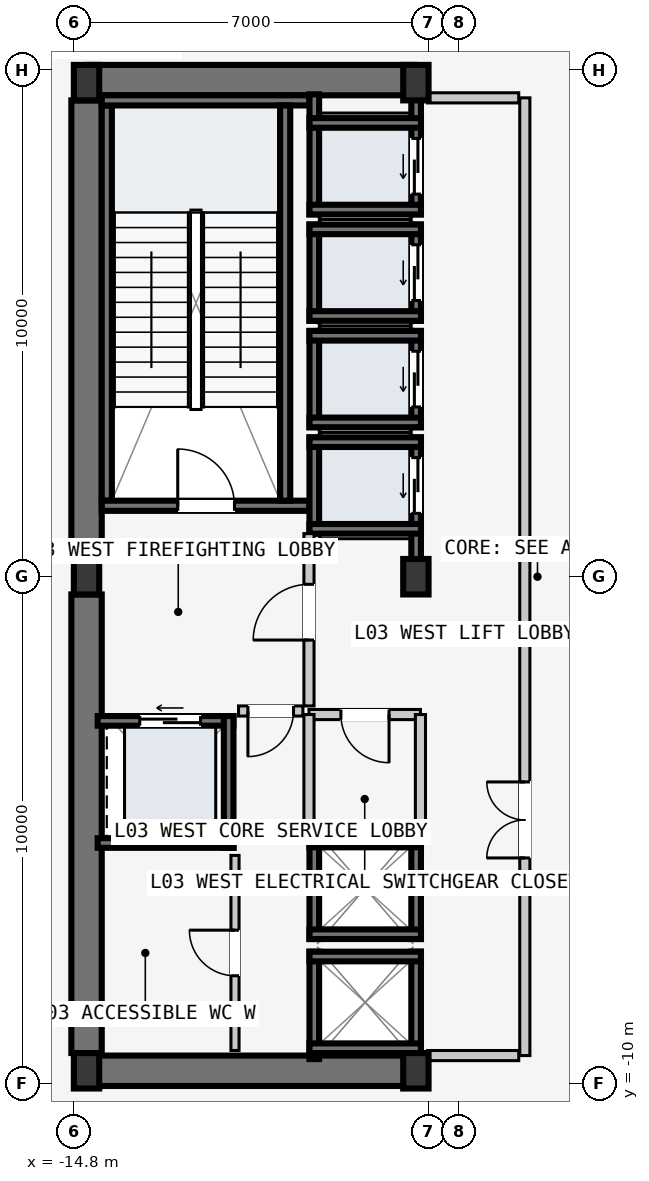
"""IFC4 building model, lengths in metres.
Left out: names, types, materials, properties, quantities, classifications, styles, units other than length and angle.
Written with IfcOpenShell. Run it as: python <this file> out.ifc"""

import sys

from ifc_helpers import new_model, si_unit, direction, frame, frame_2d, origin, origin_2d, place, context, subcontext, project, spatial, rectangle, i_section, extrude, element, fill, save


model = new_model("IFC4")
c1 = context("Model", 3, precision=1e-05, world=origin(), true_north=direction((0.0, 1.0)))
c2 = subcontext(c1, "Body", "Model", "MODEL_VIEW")
j1 = project(units=[si_unit("LENGTHUNIT", "METRE"), si_unit("PLANEANGLEUNIT", "RADIAN")], contexts=[c1])
p1 = place(None, origin())
s1 = spatial("IfcSite", under=j1, at=p1, CompositionType="ELEMENT")
p2 = place(p1, origin())
s2 = spatial("IfcBuilding", under=s1, at=p2, CompositionType="ELEMENT")
p3 = place(p2, frame((0.0, 0.0, 14.4)))
s3 = spatial("IfcBuildingStorey", under=s2, at=p3, CompositionType="ELEMENT", Elevation=14.4)
for number, where, z_axis, x_axis in (
    (1, (-14.53, -9.75, -0.22), (0.0, 0.0, 1.0), (1.0, 0.0, 0.0)),
    (2, (-14.53, 9.8, -0.22), (0.0, 0.0, 1.0), (1.0, 0.0, 0.0)),
):
    element("IfcWall", number, at=place(p3, frame(where, z_axis=z_axis, x_axis=x_axis)), inside=s3, PredefinedType="SHEAR", context=c2, shape_type="SweptSolid", body=[
        extrude(rectangle(XDim=6.46, YDim=0.6, at=frame_2d((3.23, 0.0))), origin(), (0.0, 0.0, 1.0), 4.8),
    ])
for number, where, z_axis, x_axis in (
    (3, (-14.55, -9.4, -0.22), (0.0, 0.0, 1.0), (0.0, 1.0, 0.0)),
    (4, (-14.55, 0.35, -0.22), (0.0, 0.0, 1.0), (0.0, 1.0, 0.0)),
):
    element("IfcWall", number, at=place(p3, frame(where, z_axis=z_axis, x_axis=x_axis)), inside=s3, PredefinedType="SHEAR", context=c2, shape_type="SweptSolid", body=[
        extrude(rectangle(XDim=9.05, YDim=0.6, at=frame_2d((4.525, 0.0))), origin(), (0.0, 0.0, 1.0), 4.8),
    ])
p4 = place(p3, frame((-14.15, 1.5, -0.22), z_axis=(0.0, 0.0, 1.0), x_axis=(0.0, 1.0, 0.0)))
e5 = element("IfcWall", 5, at=p4, inside=s3, PredefinedType="SOLIDWALL", context=c2, shape_type="SweptSolid", body=[
    extrude(rectangle(XDim=7.8, YDim=0.2, at=frame_2d((3.9, 0.0))), origin(), (0.0, 0.0, 1.0), 4.8),
])
p5 = place(p3, frame((-14.25, 1.4, -0.22), z_axis=(0.0, 0.0, 1.0), x_axis=(1.0, 0.0, 0.0)))
e6 = element("IfcWall", 6, at=p5, inside=s3, PredefinedType="SOLIDWALL", context=c2, shape_type="SweptSolid", body=[
    extrude(rectangle(XDim=4.1, YDim=0.2, at=frame_2d((2.05, 0.0))), origin(), (0.0, 0.0, 1.0), 4.8),
])
p6 = place(p5, frame((1.5, 0.0, 0.22)))
e7 = element("IfcOpeningElement", 7, at=p6, cuts=e6, PredefinedType="OPENING", context=c2, shape_type="SweptSolid", body=[
    extrude(rectangle(XDim=1.12, YDim=2.18, at=frame_2d((0.56, 1.09))), frame((0.0, 0.11, 0.0), z_axis=(0.0, -1.0, 0.0), x_axis=(1.0, 0.0, 0.0)), (0.0, 0.0, 1.0), 0.22),
])
p7 = place(p3, frame((-14.25, 9.4, -0.22), z_axis=(0.0, 0.0, 1.0), x_axis=(1.0, 0.0, 0.0)))
e8 = element("IfcWall", 8, at=p7, inside=s3, PredefinedType="SOLIDWALL", context=c2, shape_type="SweptSolid", body=[
    extrude(rectangle(XDim=4.1, YDim=0.2, at=frame_2d((2.05, 0.0))), origin(), (0.0, 0.0, 1.0), 4.8),
])
p8 = place(p3, frame((-10.63, 1.5, -0.22), z_axis=(0.0, 0.0, 1.0), x_axis=(0.0, 1.0, 0.0)))
e9 = element("IfcWall", 9, at=p8, inside=s3, PredefinedType="SOLIDWALL", context=c2, shape_type="SweptSolid", body=[
    extrude(rectangle(XDim=7.8, YDim=0.2, at=frame_2d((3.9, 0.0))), origin(), (0.0, 0.0, 1.0), 4.8),
])
for number, where, z_axis, x_axis in (
    (10, (-14.55, -9.75, 0.0), (0.0, 0.0, 1.0), (1.0, 0.0, 0.0)),
    (11, (-14.55, 0.0, 0.0), (0.0, 0.0, 1.0), (1.0, 0.0, 0.0)),
    (12, (-14.55, 9.75, 0.0), (0.0, 0.0, 1.0), (1.0, 0.0, 0.0)),
    (13, (-8.05, -9.75, 0.0), (0.0, 0.0, 1.0), (1.0, 0.0, 0.0)),
    (14, (-8.05, 0.0, 0.0), (0.0, 0.0, 1.0), (1.0, 0.0, 0.0)),
    (15, (-8.05, 9.75, 0.0), (0.0, 0.0, 1.0), (1.0, 0.0, 0.0)),
):
    element("IfcColumn", number, at=place(p3, frame(where, z_axis=z_axis, x_axis=x_axis)), inside=s3, PredefinedType="COLUMN", context=c2, shape_type="SweptSolid", body=[
        extrude(i_section(OverallWidth=0.5, OverallDepth=0.7, WebThickness=0.028, FlangeThickness=0.045, at=origin_2d()), origin(), (0.0, 0.0, 1.0), 4.8),
    ])
p9 = place(p3, frame((-8.045, 0.21, -0.22), z_axis=(0.0, 0.0, 1.0), x_axis=(0.0, 1.0, 0.0)))
e16 = element("IfcWall", 16, at=p9, inside=s3, PredefinedType="SOLIDWALL", context=c2, shape_type="SweptSolid", body=[
    extrude(rectangle(XDim=2.54, YDim=0.19, at=frame_2d((1.27, 0.0))), origin(), (0.0, 0.0, 1.0), 4.8),
])
p10 = place(p9, frame((1.04, 0.0, 0.22)))
e17 = element("IfcOpeningElement", 17, at=p10, cuts=e16, PredefinedType="OPENING", context=c2, shape_type="SweptSolid", body=[
    extrude(rectangle(XDim=1.1, YDim=2.2, at=frame_2d((0.55, 1.1))), frame((0.0, 0.105, 0.0), z_axis=(0.0, -1.0, 0.0), x_axis=(1.0, 0.0, 0.0)), (0.0, 0.0, 1.0), 0.21),
])
p11 = place(p3, frame((-10.055, 0.85, -0.22), z_axis=(0.0, 0.0, 1.0), x_axis=(0.0, 1.0, 0.0)))
e18 = element("IfcWall", 18, at=p11, inside=s3, PredefinedType="SOLIDWALL", context=c2, shape_type="SweptSolid", body=[
    extrude(rectangle(XDim=1.9, YDim=0.19, at=frame_2d((0.95, 0.0))), origin(), (0.0, 0.0, 1.0), 4.8),
])
for number, where, z_axis, x_axis in (
    (19, (-10.15, 2.655, -0.22), (0.0, 0.0, 1.0), (1.0, 0.0, 0.0)),
    (20, (-10.15, 0.945, -0.22), (0.0, 0.0, 1.0), (1.0, 0.0, 0.0)),
):
    element("IfcWall", number, at=place(p3, frame(where, z_axis=z_axis, x_axis=x_axis)), inside=s3, PredefinedType="SOLIDWALL", context=c2, shape_type="SweptSolid", body=[
        extrude(rectangle(XDim=2.2, YDim=0.19, at=frame_2d((1.1, 0.0))), origin(), (0.0, 0.0, 1.0), 4.8),
    ])
p12 = place(p3, frame((-8.045, 2.95, -0.22), z_axis=(0.0, 0.0, 1.0), x_axis=(0.0, 1.0, 0.0)))
e21 = element("IfcWall", 21, at=p12, inside=s3, PredefinedType="SOLIDWALL", context=c2, shape_type="SweptSolid", body=[
    extrude(rectangle(XDim=1.9, YDim=0.19, at=frame_2d((0.95, 0.0))), origin(), (0.0, 0.0, 1.0), 4.8),
])
p13 = place(p12, frame((0.4, 0.0, 0.22)))
e22 = element("IfcOpeningElement", 22, at=p13, cuts=e21, PredefinedType="OPENING", context=c2, shape_type="SweptSolid", body=[
    extrude(rectangle(XDim=1.1, YDim=2.2, at=frame_2d((0.55, 1.1))), frame((0.0, 0.105, 0.0), z_axis=(0.0, -1.0, 0.0), x_axis=(1.0, 0.0, 0.0)), (0.0, 0.0, 1.0), 0.21),
])
p14 = place(p3, frame((-10.055, 2.95, -0.22), z_axis=(0.0, 0.0, 1.0), x_axis=(0.0, 1.0, 0.0)))
e23 = element("IfcWall", 23, at=p14, inside=s3, PredefinedType="SOLIDWALL", context=c2, shape_type="SweptSolid", body=[
    extrude(rectangle(XDim=1.9, YDim=0.19, at=frame_2d((0.95, 0.0))), origin(), (0.0, 0.0, 1.0), 4.8),
])
for number, where, z_axis, x_axis in (
    (24, (-10.15, 4.755, -0.22), (0.0, 0.0, 1.0), (1.0, 0.0, 0.0)),
    (25, (-10.15, 3.045, -0.22), (0.0, 0.0, 1.0), (1.0, 0.0, 0.0)),
):
    element("IfcWall", number, at=place(p3, frame(where, z_axis=z_axis, x_axis=x_axis)), inside=s3, PredefinedType="SOLIDWALL", context=c2, shape_type="SweptSolid", body=[
        extrude(rectangle(XDim=2.2, YDim=0.19, at=frame_2d((1.1, 0.0))), origin(), (0.0, 0.0, 1.0), 4.8),
    ])
p15 = place(p3, frame((-8.045, 5.05, -0.22), z_axis=(0.0, 0.0, 1.0), x_axis=(0.0, 1.0, 0.0)))
e26 = element("IfcWall", 26, at=p15, inside=s3, PredefinedType="SOLIDWALL", context=c2, shape_type="SweptSolid", body=[
    extrude(rectangle(XDim=1.9, YDim=0.19, at=frame_2d((0.95, 0.0))), origin(), (0.0, 0.0, 1.0), 4.8),
])
p16 = place(p15, frame((0.4, 0.0, 0.22)))
e27 = element("IfcOpeningElement", 27, at=p16, cuts=e26, PredefinedType="OPENING", context=c2, shape_type="SweptSolid", body=[
    extrude(rectangle(XDim=1.1, YDim=2.2, at=frame_2d((0.55, 1.1))), frame((0.0, 0.105, 0.0), z_axis=(0.0, -1.0, 0.0), x_axis=(1.0, 0.0, 0.0)), (0.0, 0.0, 1.0), 0.21),
])
p17 = place(p3, frame((-10.055, 5.05, -0.22), z_axis=(0.0, 0.0, 1.0), x_axis=(0.0, 1.0, 0.0)))
e28 = element("IfcWall", 28, at=p17, inside=s3, PredefinedType="SOLIDWALL", context=c2, shape_type="SweptSolid", body=[
    extrude(rectangle(XDim=1.9, YDim=0.19, at=frame_2d((0.95, 0.0))), origin(), (0.0, 0.0, 1.0), 4.8),
])
for number, where, z_axis, x_axis in (
    (29, (-10.15, 6.855, -0.22), (0.0, 0.0, 1.0), (1.0, 0.0, 0.0)),
    (30, (-10.15, 5.145, -0.22), (0.0, 0.0, 1.0), (1.0, 0.0, 0.0)),
):
    element("IfcWall", number, at=place(p3, frame(where, z_axis=z_axis, x_axis=x_axis)), inside=s3, PredefinedType="SOLIDWALL", context=c2, shape_type="SweptSolid", body=[
        extrude(rectangle(XDim=2.2, YDim=0.19, at=frame_2d((1.1, 0.0))), origin(), (0.0, 0.0, 1.0), 4.8),
    ])
p18 = place(p3, frame((-8.045, 7.15, -0.22), z_axis=(0.0, 0.0, 1.0), x_axis=(0.0, 1.0, 0.0)))
e31 = element("IfcWall", 31, at=p18, inside=s3, PredefinedType="SOLIDWALL", context=c2, shape_type="SweptSolid", body=[
    extrude(rectangle(XDim=2.37, YDim=0.19, at=frame_2d((1.185, 0.0))), origin(), (0.0, 0.0, 1.0), 4.8),
])
p19 = place(p18, frame((0.4, 0.0, 0.22)))
e32 = element("IfcOpeningElement", 32, at=p19, cuts=e31, PredefinedType="OPENING", context=c2, shape_type="SweptSolid", body=[
    extrude(rectangle(XDim=1.1, YDim=2.2, at=frame_2d((0.55, 1.1))), frame((0.0, 0.105, 0.0), z_axis=(0.0, -1.0, 0.0), x_axis=(1.0, 0.0, 0.0)), (0.0, 0.0, 1.0), 0.21),
])
p20 = place(p3, frame((-10.055, 7.15, -0.22), z_axis=(0.0, 0.0, 1.0), x_axis=(0.0, 1.0, 0.0)))
e33 = element("IfcWall", 33, at=p20, inside=s3, PredefinedType="SOLIDWALL", context=c2, shape_type="SweptSolid", body=[
    extrude(rectangle(XDim=2.37, YDim=0.19, at=frame_2d((1.185, 0.0))), origin(), (0.0, 0.0, 1.0), 4.8),
])
for number, where, z_axis, x_axis in (
    (34, (-10.15, 8.955, -0.22), (0.0, 0.0, 1.0), (1.0, 0.0, 0.0)),
    (35, (-10.15, 7.245, -0.22), (0.0, 0.0, 1.0), (1.0, 0.0, 0.0)),
):
    element("IfcWall", number, at=place(p3, frame(where, z_axis=z_axis, x_axis=x_axis)), inside=s3, PredefinedType="SOLIDWALL", context=c2, shape_type="SweptSolid", body=[
        extrude(rectangle(XDim=2.2, YDim=0.19, at=frame_2d((1.1, 0.0))), origin(), (0.0, 0.0, 1.0), 4.8),
    ])
for number, where, z_axis, x_axis in (
    (36, (-8.045, -9.52, -0.22), (0.0, 0.0, 1.0), (0.0, 1.0, 0.0)),
    (37, (-10.055, -9.52, -0.22), (0.0, 0.0, 1.0), (0.0, 1.0, 0.0)),
):
    element("IfcWall", number, at=place(p3, frame(where, z_axis=z_axis, x_axis=x_axis)), inside=s3, PredefinedType="SOLIDWALL", context=c2, shape_type="SweptSolid", body=[
        extrude(rectangle(XDim=2.12, YDim=0.19, at=frame_2d((1.06, 0.0))), origin(), (0.0, 0.0, 1.0), 4.8),
    ])
for number, where, z_axis, x_axis in (
    (38, (-10.15, -7.495, -0.22), (0.0, 0.0, 1.0), (1.0, 0.0, 0.0)),
    (39, (-10.15, -9.305, -0.22), (0.0, 0.0, 1.0), (1.0, 0.0, 0.0)),
):
    element("IfcWall", number, at=place(p3, frame(where, z_axis=z_axis, x_axis=x_axis)), inside=s3, PredefinedType="SOLIDWALL", context=c2, shape_type="SweptSolid", body=[
        extrude(rectangle(XDim=2.2, YDim=0.19, at=frame_2d((1.1, 0.0))), origin(), (0.0, 0.0, 1.0), 4.8),
    ])
for number, where, z_axis, x_axis in (
    (40, (-8.045, -7.15, -0.22), (0.0, 0.0, 1.0), (0.0, 1.0, 0.0)),
    (41, (-10.055, -7.15, -0.22), (0.0, 0.0, 1.0), (0.0, 1.0, 0.0)),
):
    element("IfcWall", number, at=place(p3, frame(where, z_axis=z_axis, x_axis=x_axis)), inside=s3, PredefinedType="SOLIDWALL", context=c2, shape_type="SweptSolid", body=[
        extrude(rectangle(XDim=2.0, YDim=0.19, at=frame_2d((1.0, 0.0))), origin(), (0.0, 0.0, 1.0), 4.8),
    ])
for number, where, z_axis, x_axis in (
    (42, (-10.15, -5.245, -0.22), (0.0, 0.0, 1.0), (1.0, 0.0, 0.0)),
    (43, (-10.15, -7.055, -0.22), (0.0, 0.0, 1.0), (1.0, 0.0, 0.0)),
):
    element("IfcWall", number, at=place(p3, frame(where, z_axis=z_axis, x_axis=x_axis)), inside=s3, PredefinedType="SOLIDWALL", context=c2, shape_type="SweptSolid", body=[
        extrude(rectangle(XDim=2.2, YDim=0.19, at=frame_2d((1.1, 0.0))), origin(), (0.0, 0.0, 1.0), 4.8),
    ])
p21 = place(p3, frame((-14.33, -2.845, -0.22), z_axis=(0.0, 0.0, 1.0), x_axis=(1.0, 0.0, 0.0)))
e44 = element("IfcWall", 44, at=p21, inside=s3, PredefinedType="SOLIDWALL", context=c2, shape_type="SweptSolid", body=[
    extrude(rectangle(XDim=2.68, YDim=0.19, at=frame_2d((1.34, 0.0))), origin(), (0.0, 0.0, 1.0), 4.8),
])
p22 = place(p21, frame((0.83, 0.0, 0.22)))
e45 = element("IfcOpeningElement", 45, at=p22, cuts=e44, PredefinedType="OPENING", context=c2, shape_type="SweptSolid", body=[
    extrude(rectangle(XDim=1.2, YDim=2.2, at=frame_2d((0.6, 1.1))), frame((0.0, 0.105, 0.0), z_axis=(0.0, -1.0, 0.0), x_axis=(1.0, 0.0, 0.0)), (0.0, 0.0, 1.0), 0.21),
])
p23 = place(p3, frame((-14.33, -5.255, -0.22), z_axis=(0.0, 0.0, 1.0), x_axis=(1.0, 0.0, 0.0)))
e46 = element("IfcWall", 46, at=p23, inside=s3, PredefinedType="SOLIDWALL", context=c2, shape_type="SweptSolid", body=[
    extrude(rectangle(XDim=2.68, YDim=0.19, at=frame_2d((1.34, 0.0))), origin(), (0.0, 0.0, 1.0), 4.8),
])
p24 = place(p3, frame((-11.745, -5.35, -0.22), z_axis=(0.0, 0.0, 1.0), x_axis=(0.0, 1.0, 0.0)))
e47 = element("IfcWall", 47, at=p24, inside=s3, PredefinedType="SOLIDWALL", context=c2, shape_type="SweptSolid", body=[
    extrude(rectangle(XDim=2.6, YDim=0.19, at=frame_2d((1.3, 0.0))), origin(), (0.0, 0.0, 1.0), 4.8),
])
p25 = place(p3, frame((-5.9, -9.45, 0.0), z_axis=(0.0, 0.0, 1.0), x_axis=(0.0, 1.0, 0.0)))
e48 = element("IfcWall", 48, at=p25, inside=s3, PredefinedType="PARTITIONING", context=c2, shape_type="SweptSolid", body=[
    extrude(rectangle(XDim=18.9, YDim=0.2, at=frame_2d((9.45, 0.0))), origin(), (0.0, 0.0, 1.0), 4.58),
])
p26 = place(p25, frame((3.9, 0.0, 0.0)))
e49 = element("IfcOpeningElement", 49, at=p26, cuts=e48, PredefinedType="OPENING", context=c2, shape_type="SweptSolid", body=[
    extrude(rectangle(XDim=1.5, YDim=2.2, at=frame_2d((0.75, 1.1))), frame((0.0, 0.11, 0.0), z_axis=(0.0, -1.0, 0.0), x_axis=(1.0, 0.0, 0.0)), (0.0, 0.0, 1.0), 0.22),
])
for number, where, z_axis, x_axis in (
    (50, (-6.02, -9.45, 0.0), (0.0, 0.0, 1.0), (-1.0, 0.0, 0.0)),
    (51, (-6.02, 9.45, 0.0), (0.0, 0.0, 1.0), (-1.0, 0.0, 0.0)),
):
    element("IfcWall", number, at=place(p3, frame(where, z_axis=z_axis, x_axis=x_axis)), inside=s3, PredefinedType="PARTITIONING", context=c2, shape_type="SweptSolid", body=[
        extrude(rectangle(XDim=1.8, YDim=0.2, at=frame_2d((0.9, 0.0))), origin(), (0.0, 0.0, 1.0), 2.63),
    ])
p27 = place(p3, frame((-10.16, -2.55, 0.0), z_axis=(0.0, 0.0, 1.0), x_axis=(0.0, 1.0, 0.0)))
e52 = element("IfcWall", 52, at=p27, inside=s3, PredefinedType="PARTITIONING", context=c2, shape_type="SweptSolid", body=[
    extrude(rectangle(XDim=3.4, YDim=0.2, at=frame_2d((1.7, 0.0))), origin(), (0.0, 0.0, 1.0), 4.58),
])
p28 = place(p27, frame((1.3, 0.0, 0.0)))
e53 = element("IfcOpeningElement", 53, at=p28, cuts=e52, PredefinedType="OPENING", context=c2, shape_type="SweptSolid", body=[
    extrude(rectangle(XDim=1.1, YDim=2.15, at=frame_2d((0.55, 1.075))), frame((0.0, 0.11, 0.0), z_axis=(0.0, -1.0, 0.0), x_axis=(1.0, 0.0, 0.0)), (0.0, 0.0, 1.0), 0.22),
])
p29 = place(p3, frame((-10.28, -2.65, 0.0), z_axis=(0.0, 0.0, 1.0), x_axis=(-1.0, 0.0, 0.0)))
e54 = element("IfcWall", 54, at=p29, inside=s3, PredefinedType="PARTITIONING", context=c2, shape_type="SweptSolid", body=[
    extrude(rectangle(XDim=1.27, YDim=0.2, at=frame_2d((0.635, 0.0))), origin(), (0.0, 0.0, 1.0), 4.58),
])
p30 = place(p29, frame((0.185, 0.0, 0.0)))
e55 = element("IfcOpeningElement", 55, at=p30, cuts=e54, PredefinedType="OPENING", context=c2, shape_type="SweptSolid", body=[
    extrude(rectangle(XDim=0.9, YDim=2.15, at=frame_2d((0.45, 1.075))), frame((0.0, 0.11, 0.0), z_axis=(0.0, -1.0, 0.0), x_axis=(1.0, 0.0, 0.0)), (0.0, 0.0, 1.0), 0.22),
])
p31 = place(p3, frame((-7.96, -2.72, 0.0), z_axis=(0.0, 0.0, 1.0), x_axis=(-1.0, 0.0, 0.0)))
e56 = element("IfcWall", 56, at=p31, inside=s3, PredefinedType="PARTITIONING", context=c2, shape_type="SweptSolid", body=[
    extrude(rectangle(XDim=2.2, YDim=0.2, at=frame_2d((1.1, 0.0))), origin(), (0.0, 0.0, 1.0), 4.58),
])
p32 = place(p31, frame((0.62, 0.0, 0.0)))
e57 = element("IfcOpeningElement", 57, at=p32, cuts=e56, PredefinedType="OPENING", context=c2, shape_type="SweptSolid", body=[
    extrude(rectangle(XDim=0.95, YDim=2.1, at=frame_2d((0.475, 1.05))), frame((0.0, 0.11, 0.0), z_axis=(0.0, -1.0, 0.0), x_axis=(1.0, 0.0, 0.0)), (0.0, 0.0, 1.0), 0.22),
])
for number, where, z_axis, x_axis in (
    (58, (-7.96, -5.16, 0.0), (0.0, 0.0, 1.0), (0.0, 1.0, 0.0)),
    (59, (-10.16, -5.16, 0.0), (0.0, 0.0, 1.0), (0.0, 1.0, 0.0)),
):
    element("IfcWall", number, at=place(p3, frame(where, z_axis=z_axis, x_axis=x_axis)), inside=s3, PredefinedType="PARTITIONING", context=c2, shape_type="SweptSolid", body=[
        extrude(rectangle(XDim=2.44, YDim=0.2, at=frame_2d((1.22, 0.0))), origin(), (0.0, 0.0, 1.0), 4.58),
    ])
p33 = place(p3, frame((-11.62, -9.35, 0.0), z_axis=(0.0, 0.0, 1.0), x_axis=(0.0, 1.0, 0.0)))
e60 = element("IfcWall", 60, at=p33, inside=s3, PredefinedType="PARTITIONING", context=c2, shape_type="SweptSolid", body=[
    extrude(rectangle(XDim=3.85, YDim=0.16, at=frame_2d((1.925, 0.0))), origin(), (0.0, 0.0, 1.0), 4.58),
])
p34 = place(p33, frame((1.475, 0.0, 0.0)))
e61 = element("IfcOpeningElement", 61, at=p34, cuts=e60, PredefinedType="OPENING", context=c2, shape_type="SweptSolid", body=[
    extrude(rectangle(XDim=0.9, YDim=2.15, at=frame_2d((0.45, 1.075))), frame((0.0, 0.09, 0.0), z_axis=(0.0, -1.0, 0.0), x_axis=(1.0, 0.0, 0.0)), (0.0, 0.0, 1.0), 0.18),
])
p35 = place(p6, origin())
e62 = element("IfcDoor", 62, at=p35, inside=s3, OperationType="SINGLE_SWING_LEFT", PredefinedType="DOOR", context=c2, shape_type="SweptSolid", body=[
    extrude(rectangle(XDim=1.12, YDim=2.18, at=frame_2d((0.56, 1.09))), frame((0.0, 0.025, 0.0), z_axis=(0.0, -1.0, 0.0), x_axis=(1.0, 0.0, 0.0)), (0.0, 0.0, 1.0), 0.05),
])
fill(e7, e62)
p36 = place(p10, origin())
e63 = element("IfcDoor", 63, at=p36, inside=s3, OperationType="SLIDING_TO_LEFT", PredefinedType="DOOR", context=c2, shape_type="SweptSolid", body=[
    extrude(rectangle(XDim=1.1, YDim=2.2, at=frame_2d((0.55, 1.1))), frame((0.0, 0.025, 0.0), z_axis=(0.0, -1.0, 0.0), x_axis=(1.0, 0.0, 0.0)), (0.0, 0.0, 1.0), 0.05),
])
fill(e17, e63)
p37 = place(p13, origin())
e64 = element("IfcDoor", 64, at=p37, inside=s3, OperationType="SLIDING_TO_LEFT", PredefinedType="DOOR", context=c2, shape_type="SweptSolid", body=[
    extrude(rectangle(XDim=1.1, YDim=2.2, at=frame_2d((0.55, 1.1))), frame((0.0, 0.025, 0.0), z_axis=(0.0, -1.0, 0.0), x_axis=(1.0, 0.0, 0.0)), (0.0, 0.0, 1.0), 0.05),
])
fill(e22, e64)
p38 = place(p16, origin())
e65 = element("IfcDoor", 65, at=p38, inside=s3, OperationType="SLIDING_TO_LEFT", PredefinedType="DOOR", context=c2, shape_type="SweptSolid", body=[
    extrude(rectangle(XDim=1.1, YDim=2.2, at=frame_2d((0.55, 1.1))), frame((0.0, 0.025, 0.0), z_axis=(0.0, -1.0, 0.0), x_axis=(1.0, 0.0, 0.0)), (0.0, 0.0, 1.0), 0.05),
])
fill(e27, e65)
p39 = place(p19, origin())
e66 = element("IfcDoor", 66, at=p39, inside=s3, OperationType="SLIDING_TO_LEFT", PredefinedType="DOOR", context=c2, shape_type="SweptSolid", body=[
    extrude(rectangle(XDim=1.1, YDim=2.2, at=frame_2d((0.55, 1.1))), frame((0.0, 0.025, 0.0), z_axis=(0.0, -1.0, 0.0), x_axis=(1.0, 0.0, 0.0)), (0.0, 0.0, 1.0), 0.05),
])
fill(e32, e66)
p40 = place(p22, origin())
e67 = element("IfcDoor", 67, at=p40, inside=s3, OperationType="SLIDING_TO_LEFT", PredefinedType="DOOR", context=c2, shape_type="SweptSolid", body=[
    extrude(rectangle(XDim=1.2, YDim=2.2, at=frame_2d((0.6, 1.1))), frame((0.0, 0.025, 0.0), z_axis=(0.0, -1.0, 0.0), x_axis=(1.0, 0.0, 0.0)), (0.0, 0.0, 1.0), 0.05),
])
fill(e45, e67)
p41 = place(p26, origin())
e68 = element("IfcDoor", 68, at=p41, inside=s3, OperationType="DOUBLE_DOOR_SINGLE_SWING", PredefinedType="DOOR", context=c2, shape_type="SweptSolid", body=[
    extrude(rectangle(XDim=1.5, YDim=2.2, at=frame_2d((0.75, 1.1))), frame((0.0, 0.025, 0.0), z_axis=(0.0, -1.0, 0.0), x_axis=(1.0, 0.0, 0.0)), (0.0, 0.0, 1.0), 0.05),
])
fill(e49, e68)
p42 = place(p28, origin())
e69 = element("IfcDoor", 69, at=p42, inside=s3, OperationType="SINGLE_SWING_LEFT", PredefinedType="DOOR", context=c2, shape_type="SweptSolid", body=[
    extrude(rectangle(XDim=1.1, YDim=2.15, at=frame_2d((0.55, 1.075))), frame((0.0, 0.025, 0.0), z_axis=(0.0, -1.0, 0.0), x_axis=(1.0, 0.0, 0.0)), (0.0, 0.0, 1.0), 0.05),
])
fill(e53, e69)
p43 = place(p30, origin())
e70 = element("IfcDoor", 70, at=p43, inside=s3, OperationType="SINGLE_SWING_RIGHT", PredefinedType="DOOR", context=c2, shape_type="SweptSolid", body=[
    extrude(rectangle(XDim=0.9, YDim=2.15, at=frame_2d((0.45, 1.075))), frame((0.0, 0.025, 0.0), z_axis=(0.0, -1.0, 0.0), x_axis=(1.0, 0.0, 0.0)), (0.0, 0.0, 1.0), 0.05),
])
fill(e55, e70)
p44 = place(p32, origin())
e71 = element("IfcDoor", 71, at=p44, inside=s3, OperationType="SINGLE_SWING_LEFT", PredefinedType="DOOR", context=c2, shape_type="SweptSolid", body=[
    extrude(rectangle(XDim=0.95, YDim=2.1, at=frame_2d((0.475, 1.05))), frame((0.0, 0.025, 0.0), z_axis=(0.0, -1.0, 0.0), x_axis=(1.0, 0.0, 0.0)), (0.0, 0.0, 1.0), 0.05),
])
fill(e57, e71)
p45 = place(p34, origin())
e72 = element("IfcDoor", 72, at=p45, inside=s3, OperationType="SINGLE_SWING_RIGHT", PredefinedType="DOOR", context=c2, shape_type="SweptSolid", body=[
    extrude(rectangle(XDim=0.9, YDim=2.15, at=frame_2d((0.45, 1.075))), frame((0.0, 0.025, 0.0), z_axis=(0.0, -1.0, 0.0), x_axis=(1.0, 0.0, 0.0)), (0.0, 0.0, 1.0), 0.05),
])
fill(e61, e72)
save(model, sys.argv[1])
